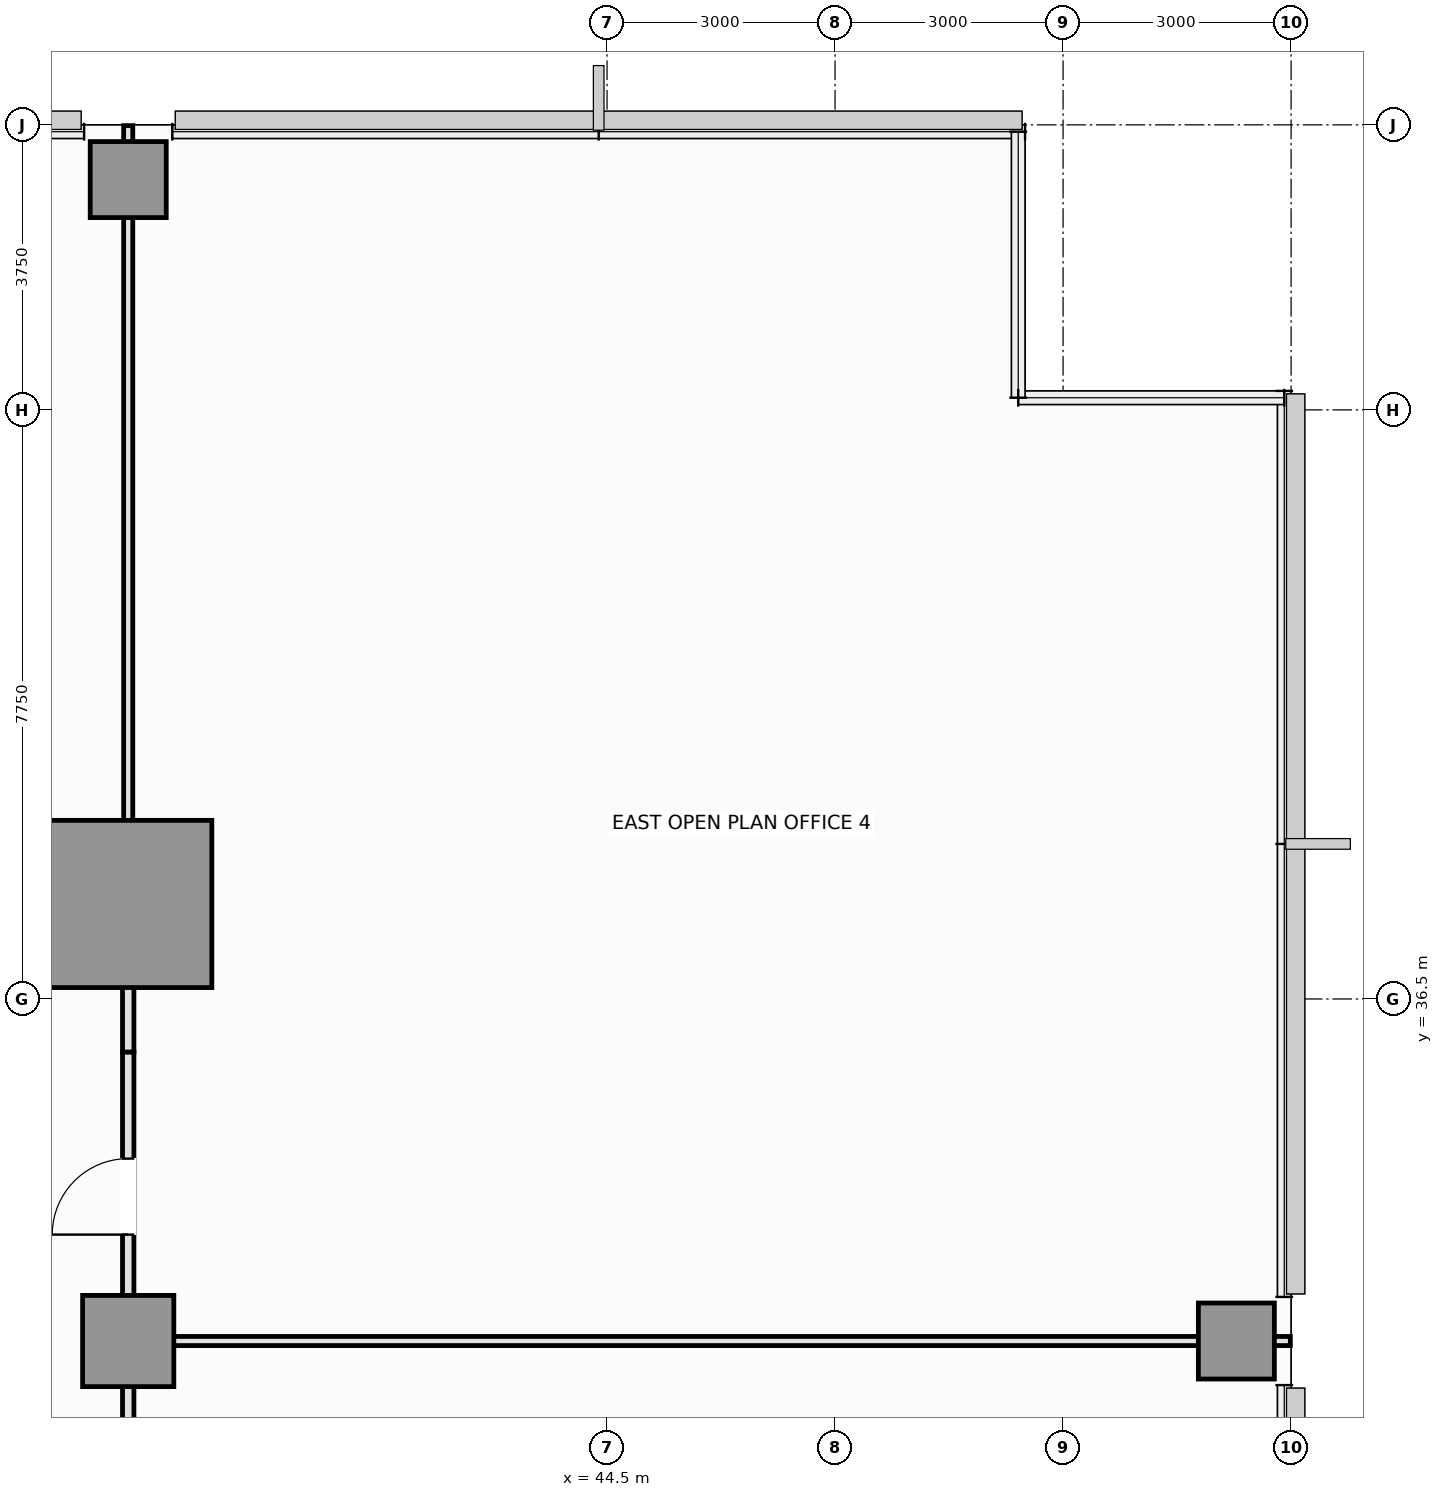
"""IFC4 building model, lengths in metres.
Left out: names, types, materials, properties, quantities, classifications, styles, units other than length and angle.
Written with IfcOpenShell. Run it as: python <this file> out.ifc"""

import sys

from ifc_helpers import new_model, si_unit, direction, frame, frame_2d, origin, origin_2d, place, context, subcontext, project, spatial, rectangle, extrude, element, fill, save


model = new_model("IFC4")
c1 = context("Model", 3, precision=1e-05, world=origin(), true_north=direction((0.0, 1.0)))
c2 = subcontext(c1, "Body", "Model", "MODEL_VIEW")
j1 = project(units=[si_unit("LENGTHUNIT", "METRE"), si_unit("PLANEANGLEUNIT", "RADIAN")], contexts=[c1])
p1 = place(None, origin())
s1 = spatial("IfcSite", under=j1, at=p1, CompositionType="ELEMENT")
p2 = place(p1, origin())
s2 = spatial("IfcBuilding", under=s1, at=p2, CompositionType="ELEMENT")
p3 = place(p2, frame((0.0, 0.0, 25.6)))
s3 = spatial("IfcBuildingStorey", under=s2, at=p3, CompositionType="ELEMENT", Elevation=25.6)
p4 = place(p3, frame((38.2, 37.75, 0.0), z_axis=(0.0, 0.0, 1.0), x_axis=(1.0, 0.0, 0.0)))
e1 = element("IfcColumn", 1, at=p4, inside=s3, PredefinedType="COLUMN", context=c2, shape_type="SweptSolid", body=[
    extrude(rectangle(XDim=2.2, YDim=2.2, at=origin_2d()), origin(), (0.0, 0.0, 1.0), 3.55),
])
p5 = place(p3, frame((38.2, 32.0, 0.0), z_axis=(0.0, 0.0, 1.0), x_axis=(1.0, 0.0, 0.0)))
e2 = element("IfcColumn", 2, at=p5, inside=s3, PredefinedType="COLUMN", context=c2, shape_type="SweptSolid", body=[
    extrude(rectangle(XDim=1.2, YDim=1.2, at=origin_2d()), origin(), (0.0, 0.0, 1.0), 3.55),
])
for number, where, z_axis, x_axis in (
    (3, (52.78, 32.0, 0.0), (0.0, 0.0, 1.0), (1.0, 0.0, 0.0)),
    (4, (38.2, 47.28, 0.0), (0.0, 0.0, 1.0), (1.0, 0.0, 0.0)),
):
    element("IfcColumn", number, at=place(p3, frame(where, z_axis=z_axis, x_axis=x_axis)), inside=s3, PredefinedType="COLUMN", context=c2, shape_type="SweptSolid", body=[
        extrude(rectangle(XDim=1.0, YDim=1.0, at=origin_2d()), origin(), (0.0, 0.0, 1.0), 3.55),
    ])
p6 = place(p3, frame((27.5, 37.7, 0.0), z_axis=(0.0, 0.0, 1.0), x_axis=(1.0, 0.0, 0.0)))
e5 = element("IfcWall", 5, at=p6, inside=s3, PredefinedType="PARTITIONING", context=c2, shape_type="SweptSolid", body=[
    extrude(rectangle(XDim=10.7, YDim=0.15, at=frame_2d((5.35, 0.0))), origin(), (0.0, 0.0, 1.0), 2.72),
])
p7 = place(p6, frame((4.85, 0.0, 0.0)))
e6 = element("IfcOpeningElement", 6, at=p7, cuts=e5, PredefinedType="OPENING", context=c2, shape_type="SweptSolid", body=[
    extrude(rectangle(XDim=1.0, YDim=2.15, at=frame_2d((0.5, 1.075))), frame((0.0, 0.085, 0.0), z_axis=(0.0, -1.0, 0.0), x_axis=(1.0, 0.0, 0.0)), (0.0, 0.0, 1.0), 0.17),
])
p8 = place(p3, frame((38.2, 35.8, 0.0), z_axis=(0.0, 0.0, 1.0), x_axis=(0.0, 1.0, 0.0)))
e7 = element("IfcWall", 7, at=p8, inside=s3, PredefinedType="PARTITIONING", context=c2, shape_type="SweptSolid", body=[
    extrude(rectangle(XDim=1.9, YDim=0.15, at=frame_2d((0.95, 0.0))), origin(), (0.0, 0.0, 1.0), 2.82),
])
p9 = place(p3, frame((38.2, 25.25, 0.0), z_axis=(0.0, 0.0, 1.0), x_axis=(0.0, 1.0, 0.0)))
e8 = element("IfcWall", 8, at=p9, inside=s3, PredefinedType="PARTITIONING", context=c2, shape_type="SweptSolid", body=[
    extrude(rectangle(XDim=6.75, YDim=0.15, at=frame_2d((3.375, 0.0))), origin(), (0.0, 0.0, 1.0), 2.82),
])
p10 = place(p9, frame((2.875, 0.0, 0.0)))
e9 = element("IfcOpeningElement", 9, at=p10, cuts=e8, PredefinedType="OPENING", context=c2, shape_type="SweptSolid", body=[
    extrude(rectangle(XDim=1.0, YDim=2.15, at=frame_2d((0.5, 1.075))), frame((0.0, 0.085, 0.0), z_axis=(0.0, -1.0, 0.0), x_axis=(1.0, 0.0, 0.0)), (0.0, 0.0, 1.0), 0.17),
])
p11 = place(p3, frame((38.2, 32.0, 0.0), z_axis=(0.0, 0.0, 1.0), x_axis=(0.0, 1.0, 0.0)))
e10 = element("IfcWall", 10, at=p11, inside=s3, PredefinedType="PARTITIONING", context=c2, shape_type="SweptSolid", body=[
    extrude(rectangle(XDim=3.8, YDim=0.15, at=frame_2d((1.9, 0.0))), origin(), (0.0, 0.0, 1.0), 2.82),
])
p12 = place(p11, frame((1.4, 0.0, 0.0)))
e11 = element("IfcOpeningElement", 11, at=p12, cuts=e10, PredefinedType="OPENING", context=c2, shape_type="SweptSolid", body=[
    extrude(rectangle(XDim=1.0, YDim=2.15, at=frame_2d((0.5, 1.075))), frame((0.0, 0.085, 0.0), z_axis=(0.0, -1.0, 0.0), x_axis=(1.0, 0.0, 0.0)), (0.0, 0.0, 1.0), 0.17),
])
p13 = place(p3, frame((38.2, 37.7, 0.0), z_axis=(0.0, 0.0, 1.0), x_axis=(0.0, 1.0, 0.0)))
e12 = element("IfcWall", 12, at=p13, inside=s3, PredefinedType="PARTITIONING", context=c2, shape_type="SweptSolid", body=[
    extrude(rectangle(XDim=10.29, YDim=0.12, at=frame_2d((5.145, 0.0))), origin(), (0.0, 0.0, 1.0), 2.82),
])
p14 = place(p3, frame((38.2, 32.0, 0.0), z_axis=(0.0, 0.0, 1.0), x_axis=(1.0, 0.0, 0.0)))
e13 = element("IfcWall", 13, at=p14, inside=s3, PredefinedType="PARTITIONING", context=c2, shape_type="SweptSolid", body=[
    extrude(rectangle(XDim=15.29, YDim=0.12, at=frame_2d((7.645, 0.0))), origin(), (0.0, 0.0, 1.0), 2.72),
])
p15 = place(p12, origin())
e14 = element("IfcDoor", 14, at=p15, inside=s3, OperationType="SINGLE_SWING_LEFT", PredefinedType="DOOR", context=c2, shape_type="SweptSolid", body=[
    extrude(rectangle(XDim=1.0, YDim=2.15, at=frame_2d((0.5, 1.075))), frame((0.0, 0.025, 0.0), z_axis=(0.0, -1.0, 0.0), x_axis=(1.0, 0.0, 0.0)), (0.0, 0.0, 1.0), 0.05),
])
fill(e11, e14)
save(model, sys.argv[1])
